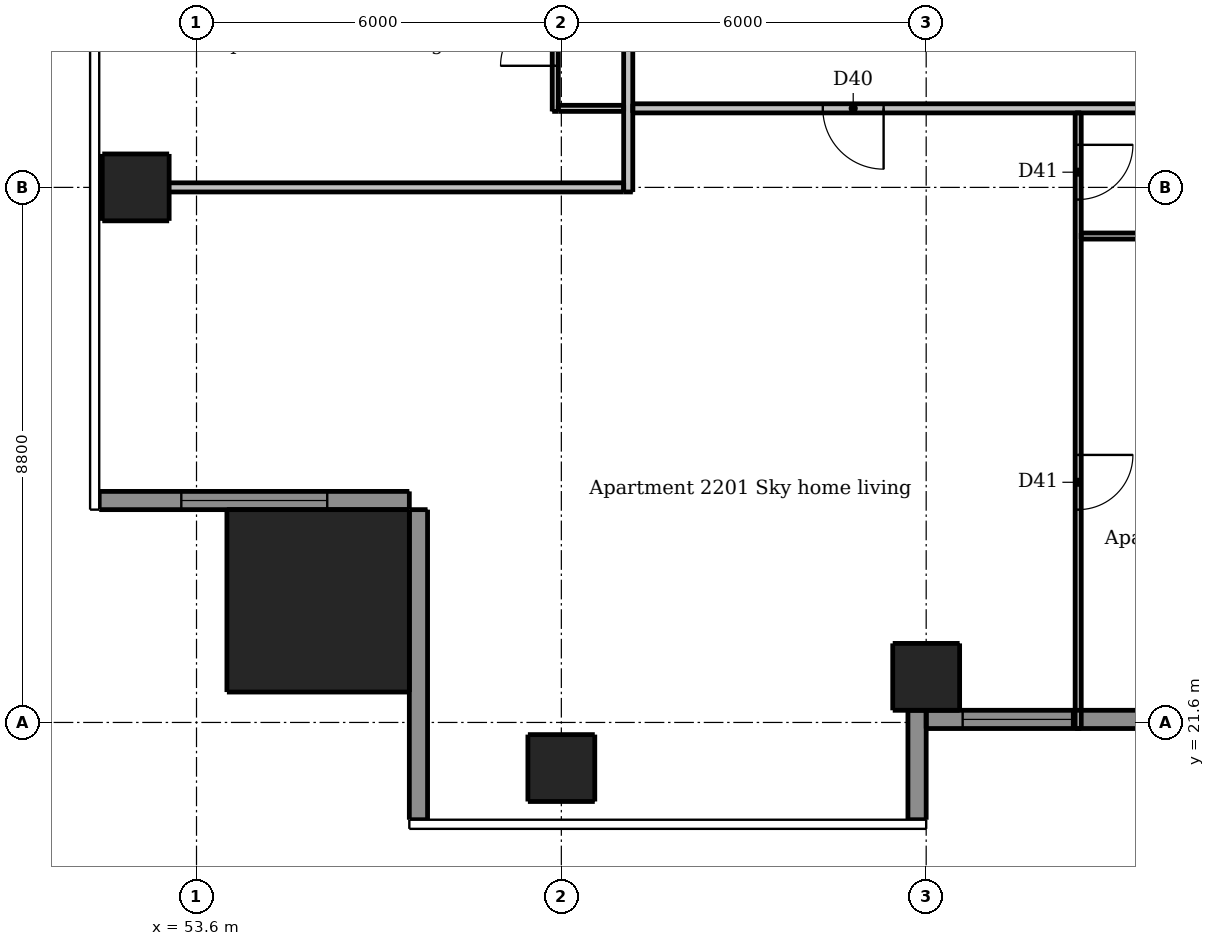
"""IFC4 building model, lengths in metres.
Left out: names, types, materials, properties, quantities, classifications, styles, units other than length and angle.
Written with IfcOpenShell. Run it as: python <this file> out.ifc"""

import sys

from ifc_helpers import new_model, si_unit, direction, frame, frame_2d, origin, origin_2d, place, context, subcontext, project, spatial, rectangle, extrude, element, fill, save


model = new_model("IFC4")
c1 = context("Model", 3, precision=1e-05, world=origin(), true_north=direction((0.0, 1.0)))
c2 = subcontext(c1, "Body", "Model", "MODEL_VIEW")
j1 = project(units=[si_unit("LENGTHUNIT", "METRE"), si_unit("PLANEANGLEUNIT", "RADIAN")], contexts=[c1])
p1 = place(None, origin())
s1 = spatial("IfcSite", under=j1, at=p1, CompositionType="ELEMENT")
p2 = place(p1, origin())
s2 = spatial("IfcBuilding", under=s1, at=p2, CompositionType="ELEMENT")
p3 = place(p2, frame((0.0, 0.0, 85.3)))
s3 = spatial("IfcBuildingStorey", under=s2, at=p3, CompositionType="ELEMENT", Elevation=85.3)
for number, where, z_axis, x_axis in (
    (1, (59.6, 20.85, 0.0), (0.0, 0.0, 1.0), (1.0, 0.0, 0.0)),
    (2, (65.6, 22.35, 0.0), (0.0, 0.0, 1.0), (1.0, 0.0, 0.0)),
    (3, (52.6, 30.4, 0.0), (0.0, 0.0, 1.0), (1.0, 0.0, 0.0)),
):
    element("IfcColumn", number, at=place(p3, frame(where, z_axis=z_axis, x_axis=x_axis)), inside=s3, PredefinedType="COLUMN", context=c2, shape_type="SweptSolid", body=[
        extrude(rectangle(XDim=1.1, YDim=1.1, at=origin_2d()), origin(), (0.0, 0.0, 1.0), 3.05),
    ])
p4 = place(p3, frame((55.6, 23.6, 0.0), z_axis=(0.0, 0.0, 1.0), x_axis=(1.0, 0.0, 0.0)))
e4 = element("IfcColumn", 4, at=p4, inside=s3, PredefinedType="COLUMN", context=c2, shape_type="SweptSolid", body=[
    extrude(rectangle(XDim=3.0, YDim=3.0, at=origin_2d()), origin(), (0.0, 0.0, 1.0), 3.3),
])
p5 = place(p3, frame((65.45, 20.0, 0.0), z_axis=(0.0, 0.0, 1.0), x_axis=(0.0, 1.0, 0.0)))
e5 = element("IfcWall", 5, at=p5, inside=s3, PredefinedType="SOLIDWALL", context=c2, shape_type="SweptSolid", body=[
    extrude(rectangle(XDim=1.8, YDim=0.3, at=frame_2d((0.9, 0.0))), origin(), (0.0, 0.0, 1.0), 3.05),
])
p6 = place(p3, frame((52.0, 25.25, 0.0), z_axis=(0.0, 0.0, 1.0), x_axis=(1.0, 0.0, 0.0)))
e6 = element("IfcWall", 6, at=p6, inside=s3, PredefinedType="SOLIDWALL", context=c2, shape_type="SweptSolid", body=[
    extrude(rectangle(XDim=5.1, YDim=0.3, at=frame_2d((2.55, 0.0))), origin(), (0.0, 0.0, 1.0), 3.05),
])
p7 = place(p6, frame((1.35, 0.0, 0.15)))
e7 = element("IfcOpeningElement", 7, at=p7, cuts=e6, PredefinedType="OPENING", context=c2, shape_type="SweptSolid", body=[
    extrude(rectangle(XDim=2.4, YDim=2.1, at=frame_2d((1.2, 1.05))), frame((0.0, 0.16, 0.0), z_axis=(0.0, -1.0, 0.0), x_axis=(1.0, 0.0, 0.0)), (0.0, 0.0, 1.0), 0.32),
])
p8 = place(p3, frame((57.25, 25.1, 0.0), z_axis=(0.0, 0.0, 1.0), x_axis=(0.0, -1.0, 0.0)))
e8 = element("IfcWall", 8, at=p8, inside=s3, PredefinedType="SOLIDWALL", context=c2, shape_type="SweptSolid", body=[
    extrude(rectangle(XDim=5.1, YDim=0.3, at=frame_2d((2.55, 0.0))), origin(), (0.0, 0.0, 1.0), 3.05),
])
p9 = place(p3, frame((65.6, 21.65, 0.0), z_axis=(0.0, 0.0, 1.0), x_axis=(1.0, 0.0, 0.0)))
e9 = element("IfcWall", 9, at=p9, inside=s3, PredefinedType="SOLIDWALL", context=c2, shape_type="SweptSolid", body=[
    extrude(rectangle(XDim=6.0, YDim=0.3, at=frame_2d((3.0, 0.0))), origin(), (0.0, 0.0, 1.0), 3.05),
])
p10 = place(p9, frame((0.6, 0.0, 0.15)))
e10 = element("IfcOpeningElement", 10, at=p10, cuts=e9, PredefinedType="OPENING", context=c2, shape_type="SweptSolid", body=[
    extrude(rectangle(XDim=1.8, YDim=2.1, at=frame_2d((0.9, 1.05))), frame((0.0, 0.16, 0.0), z_axis=(0.0, -1.0, 0.0), x_axis=(1.0, 0.0, 0.0)), (0.0, 0.0, 1.0), 0.32),
])
p11 = place(p9, frame((3.6, 0.0, 0.15)))
e11 = element("IfcOpeningElement", 11, at=p11, cuts=e9, PredefinedType="OPENING", context=c2, shape_type="SweptSolid", body=[
    extrude(rectangle(XDim=1.8, YDim=2.1, at=frame_2d((0.9, 1.05))), frame((0.0, 0.16, 0.0), z_axis=(0.0, -1.0, 0.0), x_axis=(1.0, 0.0, 0.0)), (0.0, 0.0, 1.0), 0.32),
])
p12 = place(p3, frame((59.5, 31.65, 0.0), z_axis=(0.0, 0.0, 1.0), x_axis=(0.0, 1.0, 0.0)))
e12 = element("IfcWall", 12, at=p12, inside=s3, PredefinedType="PARTITIONING", context=c2, shape_type="SweptSolid", body=[
    extrude(rectangle(XDim=16.675, YDim=0.1, at=frame_2d((8.337, 0.0))), origin(), (0.0, 0.0, 1.0), 2.51),
])
p13 = place(p12, frame((0.75, 0.0, 0.0)))
e13 = element("IfcOpeningElement", 13, at=p13, cuts=e12, PredefinedType="OPENING", context=c2, shape_type="SweptSolid", body=[
    extrude(rectangle(XDim=0.9, YDim=2.1, at=frame_2d((0.45, 1.05))), frame((0.0, 0.06, 0.0), z_axis=(0.0, -1.0, 0.0), x_axis=(1.0, 0.0, 0.0)), (0.0, 0.0, 1.0), 0.12),
])
p14 = place(p12, frame((3.1, 0.0, 0.0)))
e14 = element("IfcOpeningElement", 14, at=p14, cuts=e12, PredefinedType="OPENING", context=c2, shape_type="SweptSolid", body=[
    extrude(rectangle(XDim=0.9, YDim=2.1, at=frame_2d((0.45, 1.05))), frame((0.0, 0.06, 0.0), z_axis=(0.0, -1.0, 0.0), x_axis=(1.0, 0.0, 0.0)), (0.0, 0.0, 1.0), 0.12),
])
p15 = place(p12, frame((8.5, 0.0, 0.0)))
e15 = element("IfcOpeningElement", 15, at=p15, cuts=e12, PredefinedType="OPENING", context=c2, shape_type="SweptSolid", body=[
    extrude(rectangle(XDim=0.9, YDim=2.1, at=frame_2d((0.45, 1.05))), frame((0.0, 0.06, 0.0), z_axis=(0.0, -1.0, 0.0), x_axis=(1.0, 0.0, 0.0)), (0.0, 0.0, 1.0), 0.12),
])
p16 = place(p12, frame((14.5, 0.0, 0.0)))
e16 = element("IfcOpeningElement", 16, at=p16, cuts=e12, PredefinedType="OPENING", context=c2, shape_type="SweptSolid", body=[
    extrude(rectangle(XDim=0.9, YDim=2.1, at=frame_2d((0.45, 1.05))), frame((0.0, 0.06, 0.0), z_axis=(0.0, -1.0, 0.0), x_axis=(1.0, 0.0, 0.0)), (0.0, 0.0, 1.0), 0.12),
])
p17 = place(p12, frame((5.55, 0.0, 0.0)))
e17 = element("IfcOpeningElement", 17, at=p17, cuts=e12, PredefinedType="OPENING", context=c2, shape_type="SweptSolid", body=[
    extrude(rectangle(XDim=0.8, YDim=2.1, at=frame_2d((0.4, 1.05))), frame((0.0, 0.06, 0.0), z_axis=(0.0, -1.0, 0.0), x_axis=(1.0, 0.0, 0.0)), (0.0, 0.0, 1.0), 0.12),
])
p18 = place(p12, frame((11.55, 0.0, 0.0)))
e18 = element("IfcOpeningElement", 18, at=p18, cuts=e12, PredefinedType="OPENING", context=c2, shape_type="SweptSolid", body=[
    extrude(rectangle(XDim=0.8, YDim=2.1, at=frame_2d((0.4, 1.05))), frame((0.0, 0.06, 0.0), z_axis=(0.0, -1.0, 0.0), x_axis=(1.0, 0.0, 0.0)), (0.0, 0.0, 1.0), 0.12),
])
p19 = place(p3, frame((68.1, 31.625, 0.0), z_axis=(0.0, 0.0, 1.0), x_axis=(0.0, -1.0, 0.0)))
e19 = element("IfcWall", 19, at=p19, inside=s3, PredefinedType="PARTITIONING", context=c2, shape_type="SweptSolid", body=[
    extrude(rectangle(XDim=10.125, YDim=0.1, at=frame_2d((5.062, 0.0))), origin(), (0.0, 0.0, 1.0), 3.05),
])
p20 = place(p19, frame((0.525, 0.0, 0.0)))
e20 = element("IfcOpeningElement", 20, at=p20, cuts=e19, PredefinedType="OPENING", context=c2, shape_type="SweptSolid", body=[
    extrude(rectangle(XDim=0.9, YDim=2.1, at=frame_2d((0.45, 1.05))), frame((0.0, 0.06, 0.0), z_axis=(0.0, -1.0, 0.0), x_axis=(1.0, 0.0, 0.0)), (0.0, 0.0, 1.0), 0.12),
])
p21 = place(p19, frame((5.625, 0.0, 0.0)))
e21 = element("IfcOpeningElement", 21, at=p21, cuts=e19, PredefinedType="OPENING", context=c2, shape_type="SweptSolid", body=[
    extrude(rectangle(XDim=0.9, YDim=2.1, at=frame_2d((0.45, 1.05))), frame((0.0, 0.06, 0.0), z_axis=(0.0, -1.0, 0.0), x_axis=(1.0, 0.0, 0.0)), (0.0, 0.0, 1.0), 0.12),
])
p22 = place(p3, frame((59.55, 31.7, 0.0), z_axis=(0.0, 0.0, 1.0), x_axis=(1.0, 0.0, 0.0)))
e22 = element("IfcWall", 22, at=p22, inside=s3, PredefinedType="PARTITIONING", context=c2, shape_type="SweptSolid", body=[
    extrude(rectangle(XDim=1.075, YDim=0.1, at=frame_2d((0.538, 0.0))), origin(), (0.0, 0.0, 1.0), 3.05),
])
p23 = place(p3, frame((68.15, 29.6, 0.0), z_axis=(0.0, 0.0, 1.0), x_axis=(1.0, 0.0, 0.0)))
e23 = element("IfcWall", 23, at=p23, inside=s3, PredefinedType="PARTITIONING", context=c2, shape_type="SweptSolid", body=[
    extrude(rectangle(XDim=6.475, YDim=0.1, at=frame_2d((3.238, 0.0))), origin(), (0.0, 0.0, 1.0), 3.05),
])
p24 = place(p23, frame((4.05, 0.0, 0.0)))
e24 = element("IfcOpeningElement", 24, at=p24, cuts=e23, PredefinedType="OPENING", context=c2, shape_type="SweptSolid", body=[
    extrude(rectangle(XDim=0.8, YDim=2.1, at=frame_2d((0.4, 1.05))), frame((0.0, 0.06, 0.0), z_axis=(0.0, -1.0, 0.0), x_axis=(1.0, 0.0, 0.0)), (0.0, 0.0, 1.0), 0.12),
])
p25 = place(p3, frame((60.7, 30.325, 0.0), z_axis=(0.0, 0.0, 1.0), x_axis=(0.0, 1.0, 0.0)))
e25 = element("IfcWall", 25, at=p25, inside=s3, PredefinedType="PARTITIONING", context=c2, shape_type="SweptSolid", body=[
    extrude(rectangle(XDim=28.9, YDim=0.15, at=frame_2d((14.45, 0.0))), origin(), (0.0, 0.0, 1.0), 3.05),
])
p26 = place(p25, frame((9.225, 0.0, 0.0)))
e26 = element("IfcOpeningElement", 26, at=p26, cuts=e25, PredefinedType="OPENING", context=c2, shape_type="SweptSolid", body=[
    extrude(rectangle(XDim=1.0, YDim=2.1, at=frame_2d((0.5, 1.05))), frame((0.0, 0.085, 0.0), z_axis=(0.0, -1.0, 0.0), x_axis=(1.0, 0.0, 0.0)), (0.0, 0.0, 1.0), 0.17),
])
p27 = place(p25, frame((26.025, 0.0, 0.0)))
e27 = element("IfcOpeningElement", 27, at=p27, cuts=e25, PredefinedType="OPENING", context=c2, shape_type="SweptSolid", body=[
    extrude(rectangle(XDim=1.0, YDim=2.1, at=frame_2d((0.5, 1.05))), frame((0.0, 0.085, 0.0), z_axis=(0.0, -1.0, 0.0), x_axis=(1.0, 0.0, 0.0)), (0.0, 0.0, 1.0), 0.17),
])
p28 = place(p3, frame((89.525, 31.7, 0.0), z_axis=(0.0, 0.0, 1.0), x_axis=(-1.0, 0.0, 0.0)))
e28 = element("IfcWall", 28, at=p28, inside=s3, PredefinedType="PARTITIONING", context=c2, shape_type="SweptSolid", body=[
    extrude(rectangle(XDim=28.75, YDim=0.15, at=frame_2d((14.375, 0.0))), origin(), (0.0, 0.0, 1.0), 3.05),
])
p29 = place(p28, frame((24.625, 0.0, 0.0)))
e29 = element("IfcOpeningElement", 29, at=p29, cuts=e28, PredefinedType="OPENING", context=c2, shape_type="SweptSolid", body=[
    extrude(rectangle(XDim=1.0, YDim=2.1, at=frame_2d((0.5, 1.05))), frame((0.0, 0.085, 0.0), z_axis=(0.0, -1.0, 0.0), x_axis=(1.0, 0.0, 0.0)), (0.0, 0.0, 1.0), 0.17),
])
p30 = place(p28, frame((7.525, 0.0, 0.0)))
e30 = element("IfcOpeningElement", 30, at=p30, cuts=e28, PredefinedType="OPENING", context=c2, shape_type="SweptSolid", body=[
    extrude(rectangle(XDim=1.0, YDim=2.1, at=frame_2d((0.5, 1.05))), frame((0.0, 0.085, 0.0), z_axis=(0.0, -1.0, 0.0), x_axis=(1.0, 0.0, 0.0)), (0.0, 0.0, 1.0), 0.17),
])
p31 = place(p3, frame((52.0, 30.4, 0.0), z_axis=(0.0, 0.0, 1.0), x_axis=(1.0, 0.0, 0.0)))
e31 = element("IfcWall", 31, at=p31, inside=s3, PredefinedType="PARTITIONING", context=c2, shape_type="SweptSolid", body=[
    extrude(rectangle(XDim=8.625, YDim=0.15, at=frame_2d((4.312, 0.0))), origin(), (0.0, 0.0, 1.0), 2.647),
])
p32 = place(p7, origin())
e32 = element("IfcWindow", 32, at=p32, inside=s3, PartitioningType="DOUBLE_PANEL_VERTICAL", PredefinedType="WINDOW", context=c2, shape_type="SweptSolid", body=[
    extrude(rectangle(XDim=2.4, YDim=2.1, at=frame_2d((1.2, 1.05))), frame((0.0, 0.03, 0.0), z_axis=(0.0, -1.0, 0.0), x_axis=(1.0, 0.0, 0.0)), (0.0, 0.0, 1.0), 0.06),
])
fill(e7, e32)
p33 = place(p10, origin())
e33 = element("IfcWindow", 33, at=p33, inside=s3, PartitioningType="DOUBLE_PANEL_VERTICAL", PredefinedType="WINDOW", context=c2, shape_type="SweptSolid", body=[
    extrude(rectangle(XDim=1.8, YDim=2.1, at=frame_2d((0.9, 1.05))), frame((0.0, 0.03, 0.0), z_axis=(0.0, -1.0, 0.0), x_axis=(1.0, 0.0, 0.0)), (0.0, 0.0, 1.0), 0.06),
])
fill(e10, e33)
p34 = place(p29, origin())
e34 = element("IfcDoor", 34, at=p34, inside=s3, OperationType="SINGLE_SWING_LEFT", PredefinedType="DOOR", context=c2, shape_type="SweptSolid", body=[
    extrude(rectangle(XDim=1.0, YDim=2.1, at=frame_2d((0.5, 1.05))), frame((0.0, 0.025, 0.0), z_axis=(0.0, -1.0, 0.0), x_axis=(1.0, 0.0, 0.0)), (0.0, 0.0, 1.0), 0.05),
])
fill(e29, e34)
p35 = place(p20, origin())
e35 = element("IfcDoor", 35, at=p35, inside=s3, OperationType="SINGLE_SWING_LEFT", PredefinedType="DOOR", context=c2, shape_type="SweptSolid", body=[
    extrude(rectangle(XDim=0.9, YDim=2.1, at=frame_2d((0.45, 1.05))), frame((0.0, 0.025, 0.0), z_axis=(0.0, -1.0, 0.0), x_axis=(1.0, 0.0, 0.0)), (0.0, 0.0, 1.0), 0.05),
])
fill(e20, e35)
p36 = place(p21, origin())
e36 = element("IfcDoor", 36, at=p36, inside=s3, OperationType="SINGLE_SWING_LEFT", PredefinedType="DOOR", context=c2, shape_type="SweptSolid", body=[
    extrude(rectangle(XDim=0.9, YDim=2.1, at=frame_2d((0.45, 1.05))), frame((0.0, 0.025, 0.0), z_axis=(0.0, -1.0, 0.0), x_axis=(1.0, 0.0, 0.0)), (0.0, 0.0, 1.0), 0.05),
])
fill(e21, e36)
p37 = place(p13, origin())
e37 = element("IfcDoor", 37, at=p37, inside=s3, OperationType="SINGLE_SWING_LEFT", PredefinedType="DOOR", context=c2, shape_type="SweptSolid", body=[
    extrude(rectangle(XDim=0.9, YDim=2.1, at=frame_2d((0.45, 1.05))), frame((0.0, 0.025, 0.0), z_axis=(0.0, -1.0, 0.0), x_axis=(1.0, 0.0, 0.0)), (0.0, 0.0, 1.0), 0.05),
])
fill(e13, e37)
save(model, sys.argv[1])
